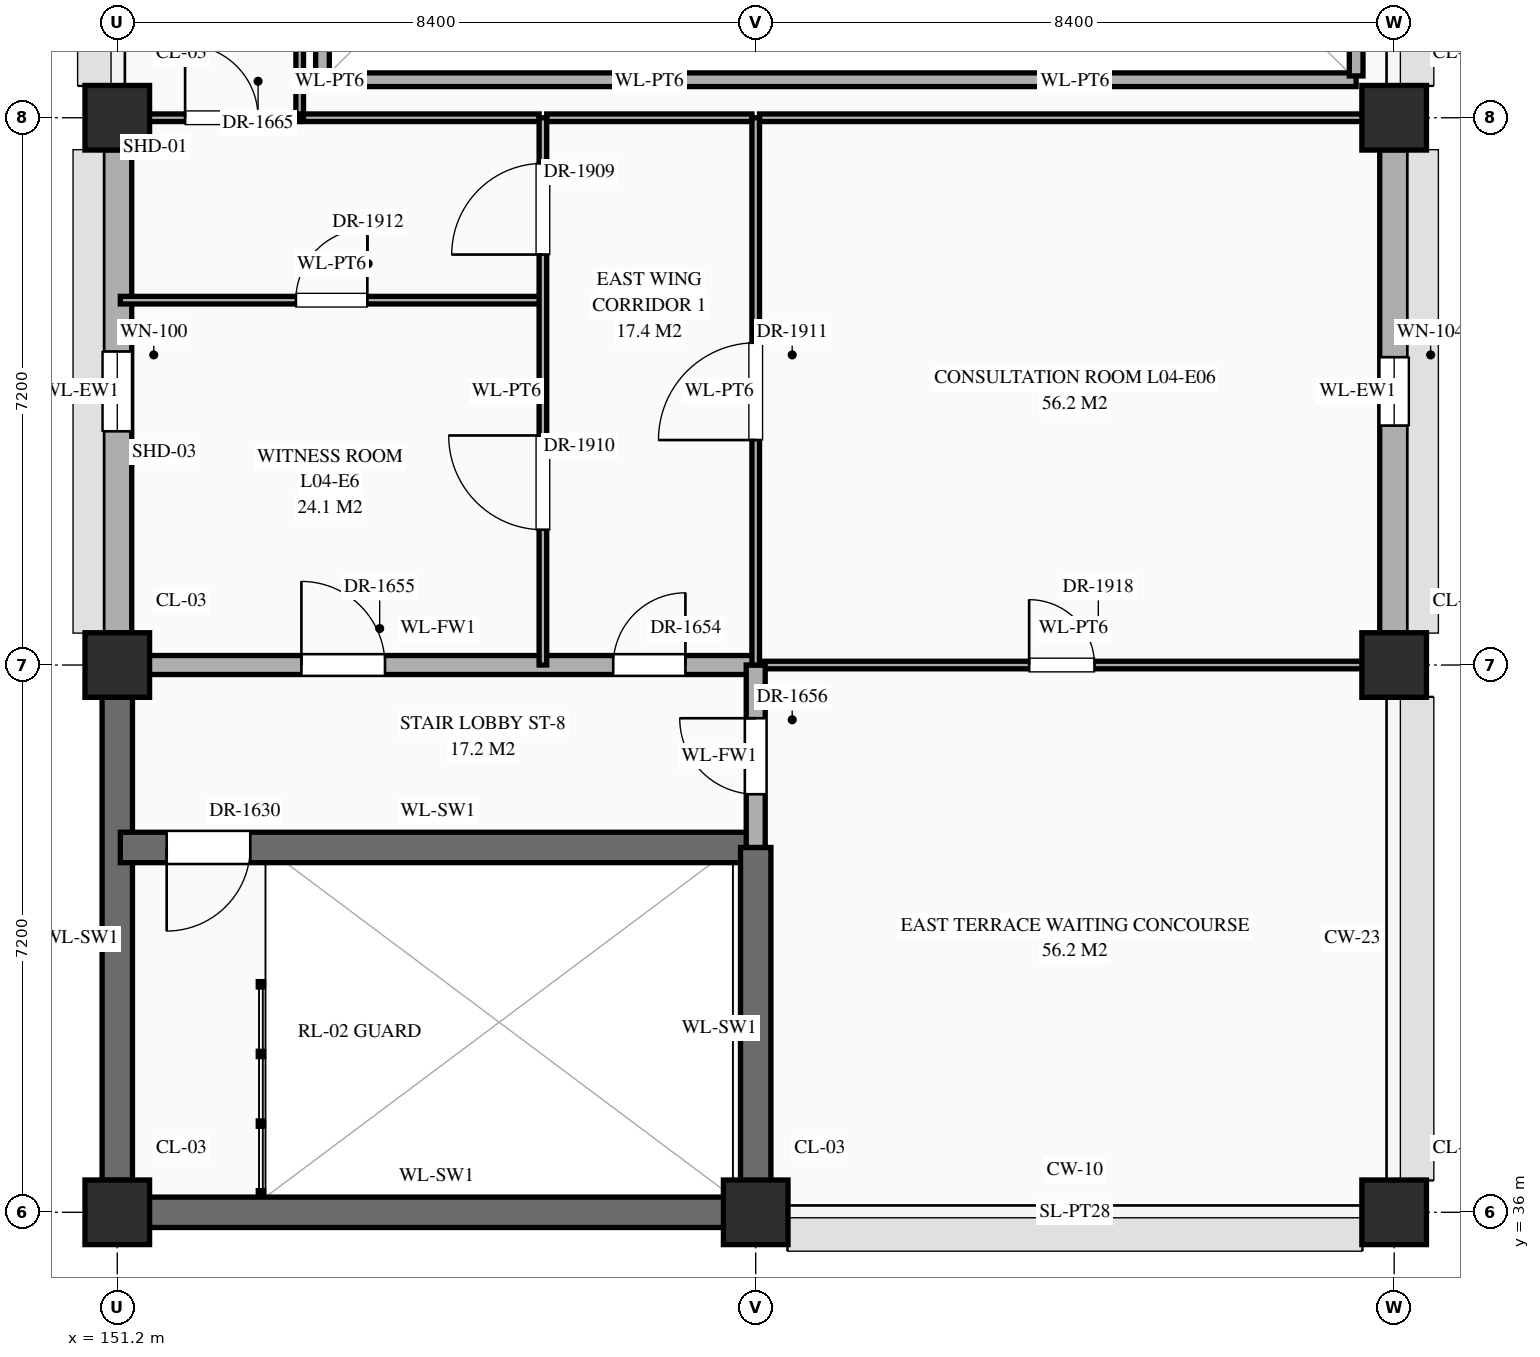
"""IFC4 building model, lengths in metres.
Left out: names, types, materials, properties, quantities, classifications, styles, units other than length and angle.
Written with IfcOpenShell. Run it as: python <this file> out.ifc"""

import sys

from ifc_helpers import new_model, si_unit, direction, frame, frame_2d, origin, origin_2d, place, context, subcontext, project, spatial, rectangle, extrude, element, fill, save


model = new_model("IFC4")
c1 = context("Model", 3, precision=1e-05, world=origin(), true_north=direction((0.0, 1.0)))
c2 = subcontext(c1, "Body", "Model", "MODEL_VIEW")
j1 = project(units=[si_unit("LENGTHUNIT", "METRE"), si_unit("PLANEANGLEUNIT", "RADIAN")], contexts=[c1])
p1 = place(None, origin())
s1 = spatial("IfcSite", under=j1, at=p1, CompositionType="ELEMENT")
p2 = place(p1, origin())
s2 = spatial("IfcBuilding", under=s1, at=p2, CompositionType="ELEMENT")
p3 = place(p2, frame((0.0, 0.0, 16.2)))
s3 = spatial("IfcBuildingStorey", under=s2, at=p3, CompositionType="ELEMENT", Elevation=16.2)
for number, where, z_axis, x_axis in (
    (1, (151.2, 36.0, 0.0), (0.0, 0.0, 1.0), (1.0, 0.0, 0.0)),
    (2, (151.2, 43.2, 0.0), (0.0, 0.0, 1.0), (1.0, 0.0, 0.0)),
    (3, (151.2, 50.4, 0.0), (0.0, 0.0, 1.0), (1.0, 0.0, 0.0)),
    (4, (159.6, 36.0, 0.0), (0.0, 0.0, 1.0), (1.0, 0.0, 0.0)),
    (5, (168.0, 36.0, 0.0), (0.0, 0.0, 1.0), (1.0, 0.0, 0.0)),
    (6, (168.0, 43.2, 0.0), (0.0, 0.0, 1.0), (1.0, 0.0, 0.0)),
    (7, (168.0, 50.4, 0.0), (0.0, 0.0, 1.0), (1.0, 0.0, 0.0)),
):
    element("IfcColumn", number, at=place(p3, frame(where, z_axis=z_axis, x_axis=x_axis)), inside=s3, PredefinedType="COLUMN", context=c2, shape_type="SweptSolid", body=[
        extrude(rectangle(XDim=0.85, YDim=0.85, at=origin_2d()), origin(), (0.0, 0.0, 1.0), 5.4),
    ])
p4 = place(p3, frame((151.62, 36.0, 0.0), z_axis=(0.0, 0.0, 1.0), x_axis=(1.0, 0.0, 0.0)))
e8 = element("IfcWall", 8, at=p4, inside=s3, PredefinedType="SHEAR", context=c2, shape_type="SweptSolid", body=[
    extrude(rectangle(XDim=7.56, YDim=0.4, at=frame_2d((3.78, 0.0))), origin(), (0.0, 0.0, 1.0), 5.2),
])
p5 = place(p3, frame((151.2, 36.42, 0.0), z_axis=(0.0, 0.0, 1.0), x_axis=(0.0, 1.0, 0.0)))
e9 = element("IfcWall", 9, at=p5, inside=s3, PredefinedType="SHEAR", context=c2, shape_type="SweptSolid", body=[
    extrude(rectangle(XDim=6.36, YDim=0.4, at=frame_2d((3.18, 0.0))), origin(), (0.0, 0.0, 1.0), 5.2),
])
p6 = place(p3, frame((151.2, 43.62, 0.0), z_axis=(0.0, 0.0, 1.0), x_axis=(0.0, 1.0, 0.0)))
e10 = element("IfcWall", 10, at=p6, inside=s3, PredefinedType="STANDARD", context=c2, shape_type="SweptSolid", body=[
    extrude(rectangle(XDim=6.36, YDim=0.38, at=frame_2d((3.18, 0.0))), origin(), (0.0, 0.0, 1.0), 4.55),
])
p7 = place(p6, frame((2.655, 0.0, 0.85)))
e11 = element("IfcOpeningElement", 11, at=p7, cuts=e10, PredefinedType="OPENING", context=c2, shape_type="SweptSolid", body=[
    extrude(rectangle(XDim=1.05, YDim=1.2, at=frame_2d((0.525, 0.6))), frame((0.0, 0.202, 0.0), z_axis=(0.0, -1.0, 0.0), x_axis=(1.0, 0.0, 0.0)), (0.0, 0.0, 1.0), 0.404),
])
p8 = place(p3, frame((168.0, 43.62, 0.0), z_axis=(0.0, 0.0, 1.0), x_axis=(0.0, 1.0, 0.0)))
e12 = element("IfcWall", 12, at=p8, inside=s3, PredefinedType="STANDARD", context=c2, shape_type="SweptSolid", body=[
    extrude(rectangle(XDim=6.36, YDim=0.38, at=frame_2d((3.18, 0.0))), origin(), (0.0, 0.0, 1.0), 4.55),
])
p9 = place(p8, frame((2.73, 0.0, 0.85)))
e13 = element("IfcOpeningElement", 13, at=p9, cuts=e12, PredefinedType="OPENING", context=c2, shape_type="SweptSolid", body=[
    extrude(rectangle(XDim=0.9, YDim=1.92, at=frame_2d((0.45, 0.96))), frame((0.0, 0.202, 0.0), z_axis=(0.0, -1.0, 0.0), x_axis=(1.0, 0.0, 0.0)), (0.0, 0.0, 1.0), 0.404),
])
p10 = place(p3, frame((151.24, 40.8, 0.0), z_axis=(0.0, 0.0, 1.0), x_axis=(1.0, 0.0, 0.0)))
e14 = element("IfcWall", 14, at=p10, inside=s3, PredefinedType="SHEAR", context=c2, shape_type="SweptSolid", body=[
    extrude(rectangle(XDim=8.36, YDim=0.4, at=frame_2d((4.18, 0.0))), origin(), (0.0, 0.0, 1.0), 5.2),
])
p11 = place(p10, frame((0.61, 0.0, 0.0)))
e15 = element("IfcOpeningElement", 15, at=p11, cuts=e14, PredefinedType="OPENING", context=c2, shape_type="SweptSolid", body=[
    extrude(rectangle(XDim=1.1, YDim=2.2, at=frame_2d((0.55, 1.1))), frame((0.0, 0.212, 0.0), z_axis=(0.0, -1.0, 0.0), x_axis=(1.0, 0.0, 0.0)), (0.0, 0.0, 1.0), 0.424),
])
p12 = place(p3, frame((151.24, 43.2, 0.0), z_axis=(0.0, 0.0, 1.0), x_axis=(1.0, 0.0, 0.0)))
e16 = element("IfcWall", 16, at=p12, inside=s3, PredefinedType="STANDARD", context=c2, shape_type="SweptSolid", body=[
    extrude(rectangle(XDim=8.36, YDim=0.25, at=frame_2d((4.18, 0.0))), origin(), (0.0, 0.0, 1.0), 4.15),
])
p13 = place(p12, frame((6.485, 0.0, 0.0)))
e17 = element("IfcOpeningElement", 17, at=p13, cuts=e16, PredefinedType="OPENING", context=c2, shape_type="SweptSolid", body=[
    extrude(rectangle(XDim=0.95, YDim=2.15, at=frame_2d((0.475, 1.075))), frame((0.0, 0.137, 0.0), z_axis=(0.0, -1.0, 0.0), x_axis=(1.0, 0.0, 0.0)), (0.0, 0.0, 1.0), 0.274),
])
p14 = place(p12, frame((2.383, 0.0, 0.0)))
e18 = element("IfcOpeningElement", 18, at=p14, cuts=e16, PredefinedType="OPENING", context=c2, shape_type="SweptSolid", body=[
    extrude(rectangle(XDim=1.1, YDim=2.2, at=frame_2d((0.55, 1.1))), frame((0.0, 0.137, 0.0), z_axis=(0.0, -1.0, 0.0), x_axis=(1.0, 0.0, 0.0)), (0.0, 0.0, 1.0), 0.274),
])
p15 = place(p3, frame((159.6, 43.2, 0.0), z_axis=(0.0, 0.0, 1.0), x_axis=(1.0, 0.0, 0.0)))
e19 = element("IfcWall", 19, at=p15, inside=s3, PredefinedType="STANDARD", context=c2, shape_type="SweptSolid", body=[
    extrude(rectangle(XDim=8.36, YDim=0.1, at=frame_2d((4.18, 0.0))), origin(), (0.0, 0.0, 1.0), 4.15),
])
p16 = place(p15, frame((3.597, 0.0, 0.0)))
e20 = element("IfcOpeningElement", 20, at=p16, cuts=e19, PredefinedType="OPENING", context=c2, shape_type="SweptSolid", body=[
    extrude(rectangle(XDim=0.86, YDim=2.1, at=frame_2d((0.43, 1.05))), frame((0.0, 0.062, 0.0), z_axis=(0.0, -1.0, 0.0), x_axis=(1.0, 0.0, 0.0)), (0.0, 0.0, 1.0), 0.124),
])
p17 = place(p3, frame((151.24, 48.0, 0.0), z_axis=(0.0, 0.0, 1.0), x_axis=(1.0, 0.0, 0.0)))
e21 = element("IfcWall", 21, at=p17, inside=s3, PredefinedType="STANDARD", context=c2, shape_type="SweptSolid", body=[
    extrude(rectangle(XDim=5.56, YDim=0.1, at=frame_2d((2.78, 0.0))), origin(), (0.0, 0.0, 1.0), 5.2),
])
p18 = place(p17, frame((2.31, 0.0, 0.0)))
e22 = element("IfcOpeningElement", 22, at=p18, cuts=e21, PredefinedType="OPENING", context=c2, shape_type="SweptSolid", body=[
    extrude(rectangle(XDim=0.94, YDim=2.3, at=frame_2d((0.47, 1.15))), frame((0.0, 0.062, 0.0), z_axis=(0.0, -1.0, 0.0), x_axis=(1.0, 0.0, 0.0)), (0.0, 0.0, 1.0), 0.124),
])
p19 = place(p3, frame((151.24, 50.4, 0.0), z_axis=(0.0, 0.0, 1.0), x_axis=(1.0, 0.0, 0.0)))
e23 = element("IfcWall", 23, at=p19, inside=s3, PredefinedType="STANDARD", context=c2, shape_type="SweptSolid", body=[
    extrude(rectangle(XDim=2.36, YDim=0.1, at=frame_2d((1.18, 0.0))), origin(), (0.0, 0.0, 1.0), 4.15),
])
p20 = place(p19, frame((0.853, 0.0, 0.0)))
e24 = element("IfcOpeningElement", 24, at=p20, cuts=e23, PredefinedType="OPENING", context=c2, shape_type="SweptSolid", body=[
    extrude(rectangle(XDim=0.96, YDim=2.2, at=frame_2d((0.48, 1.1))), frame((0.0, 0.062, 0.0), z_axis=(0.0, -1.0, 0.0), x_axis=(1.0, 0.0, 0.0)), (0.0, 0.0, 1.0), 0.124),
])
p21 = place(p3, frame((153.65, 50.4, 0.0), z_axis=(0.0, 0.0, 1.0), x_axis=(1.0, 0.0, 0.0)))
e25 = element("IfcWall", 25, at=p21, inside=s3, PredefinedType="STANDARD", context=c2, shape_type="SweptSolid", body=[
    extrude(rectangle(XDim=3.1, YDim=0.1, at=frame_2d((1.55, 0.0))), origin(), (0.0, 0.0, 1.0), 4.15),
])
p22 = place(p3, frame((156.85, 50.4, 0.0), z_axis=(0.0, 0.0, 1.0), x_axis=(1.0, 0.0, 0.0)))
e26 = element("IfcWall", 26, at=p22, inside=s3, PredefinedType="STANDARD", context=c2, shape_type="SweptSolid", body=[
    extrude(rectangle(XDim=2.7, YDim=0.1, at=frame_2d((1.35, 0.0))), origin(), (0.0, 0.0, 1.0), 4.15),
])
p23 = place(p3, frame((159.65, 50.4, 0.0), z_axis=(0.0, 0.0, 1.0), x_axis=(1.0, 0.0, 0.0)))
e27 = element("IfcWall", 27, at=p23, inside=s3, PredefinedType="STANDARD", context=c2, shape_type="SweptSolid", body=[
    extrude(rectangle(XDim=8.3, YDim=0.1, at=frame_2d((4.15, 0.0))), origin(), (0.0, 0.0, 1.0), 4.15),
])
p24 = place(p3, frame((153.9, 50.9, 0.0), z_axis=(0.0, 0.0, 1.0), x_axis=(1.0, 0.0, 0.0)))
e28 = element("IfcWall", 28, at=p24, inside=s3, PredefinedType="STANDARD", context=c2, shape_type="SweptSolid", body=[
    extrude(rectangle(XDim=13.6, YDim=0.18, at=frame_2d((6.8, 0.0))), origin(), (0.0, 0.0, 1.0), 5.2),
])
p25 = place(p3, frame((153.6, 50.45, 0.0), z_axis=(0.0, 0.0, 1.0), x_axis=(0.0, 1.0, 0.0)))
e29 = element("IfcWall", 29, at=p25, inside=s3, PredefinedType="STANDARD", context=c2, shape_type="SweptSolid", body=[
    extrude(rectangle(XDim=14.3, YDim=0.1, at=frame_2d((7.15, 0.0))), origin(), (0.0, 0.0, 1.0), 5.2),
])
p26 = place(p3, frame((153.9, 50.95, 0.0), z_axis=(0.0, 0.0, 1.0), x_axis=(0.0, 1.0, 0.0)))
e30 = element("IfcWall", 30, at=p26, inside=s3, PredefinedType="STANDARD", context=c2, shape_type="SweptSolid", body=[
    extrude(rectangle(XDim=13.3, YDim=0.18, at=frame_2d((6.65, 0.0))), origin(), (0.0, 0.0, 1.0), 5.2),
])
p27 = place(p3, frame((156.8, 43.2, 0.0), z_axis=(0.0, 0.0, 1.0), x_axis=(0.0, 1.0, 0.0)))
e31 = element("IfcWall", 31, at=p27, inside=s3, PredefinedType="STANDARD", context=c2, shape_type="SweptSolid", body=[
    extrude(rectangle(XDim=7.2, YDim=0.1, at=frame_2d((3.6, 0.0))), origin(), (0.0, 0.0, 1.0), 5.2),
])
p28 = place(p27, frame((5.4, 0.0, 0.0)))
e32 = element("IfcOpeningElement", 32, at=p28, cuts=e31, PredefinedType="OPENING", context=c2, shape_type="SweptSolid", body=[
    extrude(rectangle(XDim=1.2, YDim=2.35, at=frame_2d((0.6, 1.175))), frame((0.0, 0.062, 0.0), z_axis=(0.0, -1.0, 0.0), x_axis=(1.0, 0.0, 0.0)), (0.0, 0.0, 1.0), 0.124),
])
p29 = place(p27, frame((1.78, 0.0, 0.0)))
e33 = element("IfcOpeningElement", 33, at=p29, cuts=e31, PredefinedType="OPENING", context=c2, shape_type="SweptSolid", body=[
    extrude(rectangle(XDim=1.24, YDim=2.3, at=frame_2d((0.62, 1.15))), frame((0.0, 0.062, 0.0), z_axis=(0.0, -1.0, 0.0), x_axis=(1.0, 0.0, 0.0)), (0.0, 0.0, 1.0), 0.124),
])
p30 = place(p3, frame((159.6, 36.04, 0.0), z_axis=(0.0, 0.0, 1.0), x_axis=(0.0, 1.0, 0.0)))
e34 = element("IfcWall", 34, at=p30, inside=s3, PredefinedType="SHEAR", context=c2, shape_type="SweptSolid", body=[
    extrude(rectangle(XDim=4.76, YDim=0.4, at=frame_2d((2.38, 0.0))), origin(), (0.0, 0.0, 1.0), 5.2),
])
p31 = place(p3, frame((159.6, 40.8, 0.0), z_axis=(0.0, 0.0, 1.0), x_axis=(0.0, 1.0, 0.0)))
e35 = element("IfcWall", 35, at=p31, inside=s3, PredefinedType="STANDARD", context=c2, shape_type="SweptSolid", body=[
    extrude(rectangle(XDim=2.4, YDim=0.25, at=frame_2d((1.2, 0.0))), origin(), (0.0, 0.0, 1.0), 5.2),
])
p32 = place(p31, frame((0.7, 0.0, 0.0)))
e36 = element("IfcOpeningElement", 36, at=p32, cuts=e35, PredefinedType="OPENING", context=c2, shape_type="SweptSolid", body=[
    extrude(rectangle(XDim=1.0, YDim=2.2, at=frame_2d((0.5, 1.1))), frame((0.0, 0.137, 0.0), z_axis=(0.0, -1.0, 0.0), x_axis=(1.0, 0.0, 0.0)), (0.0, 0.0, 1.0), 0.274),
])
p33 = place(p3, frame((159.6, 43.2, 0.0), z_axis=(0.0, 0.0, 1.0), x_axis=(0.0, 1.0, 0.0)))
e37 = element("IfcWall", 37, at=p33, inside=s3, PredefinedType="STANDARD", context=c2, shape_type="SweptSolid", body=[
    extrude(rectangle(XDim=7.2, YDim=0.1, at=frame_2d((3.6, 0.0))), origin(), (0.0, 0.0, 1.0), 5.2),
])
p34 = place(p33, frame((2.96, 0.0, 0.0)))
e38 = element("IfcOpeningElement", 38, at=p34, cuts=e37, PredefinedType="OPENING", context=c2, shape_type="SweptSolid", body=[
    extrude(rectangle(XDim=1.28, YDim=2.35, at=frame_2d((0.64, 1.175))), frame((0.0, 0.062, 0.0), z_axis=(0.0, -1.0, 0.0), x_axis=(1.0, 0.0, 0.0)), (0.0, 0.0, 1.0), 0.124),
])
p35 = place(p3, frame((167.5, 50.95, 0.0), z_axis=(0.0, 0.0, 1.0), x_axis=(0.0, 1.0, 0.0)))
e39 = element("IfcWall", 39, at=p35, inside=s3, PredefinedType="STANDARD", context=c2, shape_type="SweptSolid", body=[
    extrude(rectangle(XDim=13.3, YDim=0.18, at=frame_2d((6.65, 0.0))), origin(), (0.0, 0.0, 1.0), 5.2),
])
p36 = place(p7, origin())
e40 = element("IfcWindow", 40, at=p36, inside=s3, PartitioningType="SINGLE_PANEL", PredefinedType="WINDOW", context=c2, shape_type="SweptSolid", body=[
    extrude(rectangle(XDim=1.05, YDim=1.2, at=frame_2d((0.525, 0.6))), frame((0.0, 0.03, 0.0), z_axis=(0.0, -1.0, 0.0), x_axis=(1.0, 0.0, 0.0)), (0.0, 0.0, 1.0), 0.06),
])
fill(e11, e40)
p37 = place(p9, origin())
e41 = element("IfcWindow", 41, at=p37, inside=s3, PartitioningType="SINGLE_PANEL", PredefinedType="WINDOW", context=c2, shape_type="SweptSolid", body=[
    extrude(rectangle(XDim=0.9, YDim=1.92, at=frame_2d((0.45, 0.96))), frame((0.0, 0.03, 0.0), z_axis=(0.0, -1.0, 0.0), x_axis=(1.0, 0.0, 0.0)), (0.0, 0.0, 1.0), 0.06),
])
fill(e13, e41)
p38 = place(p11, frame((1.1, 0.0, 0.0), z_axis=(0.0, 0.0, 1.0), x_axis=(-1.0, 0.0, 0.0)))
e42 = element("IfcDoor", 42, at=p38, inside=s3, OperationType="SINGLE_SWING_RIGHT", PredefinedType="DOOR", context=c2, shape_type="SweptSolid", body=[
    extrude(rectangle(XDim=1.1, YDim=2.2, at=frame_2d((0.55, 1.1))), frame((0.0, 0.025, 0.0), z_axis=(0.0, -1.0, 0.0), x_axis=(1.0, 0.0, 0.0)), (0.0, 0.0, 1.0), 0.05),
])
fill(e15, e42)
p39 = place(p13, origin())
e43 = element("IfcDoor", 43, at=p39, inside=s3, OperationType="SINGLE_SWING_RIGHT", PredefinedType="DOOR", context=c2, shape_type="SweptSolid", body=[
    extrude(rectangle(XDim=0.95, YDim=2.15, at=frame_2d((0.475, 1.075))), frame((0.0, 0.025, 0.0), z_axis=(0.0, -1.0, 0.0), x_axis=(1.0, 0.0, 0.0)), (0.0, 0.0, 1.0), 0.05),
])
fill(e17, e43)
p40 = place(p14, origin())
e44 = element("IfcDoor", 44, at=p40, inside=s3, OperationType="SINGLE_SWING_LEFT", PredefinedType="DOOR", context=c2, shape_type="SweptSolid", body=[
    extrude(rectangle(XDim=1.1, YDim=2.2, at=frame_2d((0.55, 1.1))), frame((0.0, 0.025, 0.0), z_axis=(0.0, -1.0, 0.0), x_axis=(1.0, 0.0, 0.0)), (0.0, 0.0, 1.0), 0.05),
])
fill(e18, e44)
p41 = place(p32, origin())
e45 = element("IfcDoor", 45, at=p41, inside=s3, OperationType="SINGLE_SWING_RIGHT", PredefinedType="DOOR", context=c2, shape_type="SweptSolid", body=[
    extrude(rectangle(XDim=1.0, YDim=2.2, at=frame_2d((0.5, 1.1))), frame((0.0, 0.025, 0.0), z_axis=(0.0, -1.0, 0.0), x_axis=(1.0, 0.0, 0.0)), (0.0, 0.0, 1.0), 0.05),
])
fill(e36, e45)
p42 = place(p20, origin())
e46 = element("IfcDoor", 46, at=p42, inside=s3, OperationType="SINGLE_SWING_LEFT", PredefinedType="DOOR", context=c2, shape_type="SweptSolid", body=[
    extrude(rectangle(XDim=0.96, YDim=2.2, at=frame_2d((0.48, 1.1))), frame((0.0, 0.025, 0.0), z_axis=(0.0, -1.0, 0.0), x_axis=(1.0, 0.0, 0.0)), (0.0, 0.0, 1.0), 0.05),
])
fill(e24, e46)
p43 = place(p28, origin())
e47 = element("IfcDoor", 47, at=p43, inside=s3, OperationType="SINGLE_SWING_LEFT", PredefinedType="DOOR", context=c2, shape_type="SweptSolid", body=[
    extrude(rectangle(XDim=1.2, YDim=2.35, at=frame_2d((0.6, 1.175))), frame((0.0, 0.025, 0.0), z_axis=(0.0, -1.0, 0.0), x_axis=(1.0, 0.0, 0.0)), (0.0, 0.0, 1.0), 0.05),
])
fill(e32, e47)
p44 = place(p29, origin())
e48 = element("IfcDoor", 48, at=p44, inside=s3, OperationType="SINGLE_SWING_RIGHT", PredefinedType="DOOR", context=c2, shape_type="SweptSolid", body=[
    extrude(rectangle(XDim=1.24, YDim=2.3, at=frame_2d((0.62, 1.15))), frame((0.0, 0.025, 0.0), z_axis=(0.0, -1.0, 0.0), x_axis=(1.0, 0.0, 0.0)), (0.0, 0.0, 1.0), 0.05),
])
fill(e33, e48)
p45 = place(p34, origin())
e49 = element("IfcDoor", 49, at=p45, inside=s3, OperationType="SINGLE_SWING_LEFT", PredefinedType="DOOR", context=c2, shape_type="SweptSolid", body=[
    extrude(rectangle(XDim=1.28, YDim=2.35, at=frame_2d((0.64, 1.175))), frame((0.0, 0.025, 0.0), z_axis=(0.0, -1.0, 0.0), x_axis=(1.0, 0.0, 0.0)), (0.0, 0.0, 1.0), 0.05),
])
fill(e38, e49)
p46 = place(p18, origin())
e50 = element("IfcDoor", 50, at=p46, inside=s3, OperationType="SINGLE_SWING_RIGHT", PredefinedType="DOOR", context=c2, shape_type="SweptSolid", body=[
    extrude(rectangle(XDim=0.94, YDim=2.3, at=frame_2d((0.47, 1.15))), frame((0.0, 0.025, 0.0), z_axis=(0.0, -1.0, 0.0), x_axis=(1.0, 0.0, 0.0)), (0.0, 0.0, 1.0), 0.05),
])
fill(e22, e50)
p47 = place(p16, origin())
e51 = element("IfcDoor", 51, at=p47, inside=s3, OperationType="SINGLE_SWING_LEFT", PredefinedType="DOOR", context=c2, shape_type="SweptSolid", body=[
    extrude(rectangle(XDim=0.86, YDim=2.1, at=frame_2d((0.43, 1.05))), frame((0.0, 0.025, 0.0), z_axis=(0.0, -1.0, 0.0), x_axis=(1.0, 0.0, 0.0)), (0.0, 0.0, 1.0), 0.05),
])
fill(e20, e51)
save(model, sys.argv[1])
